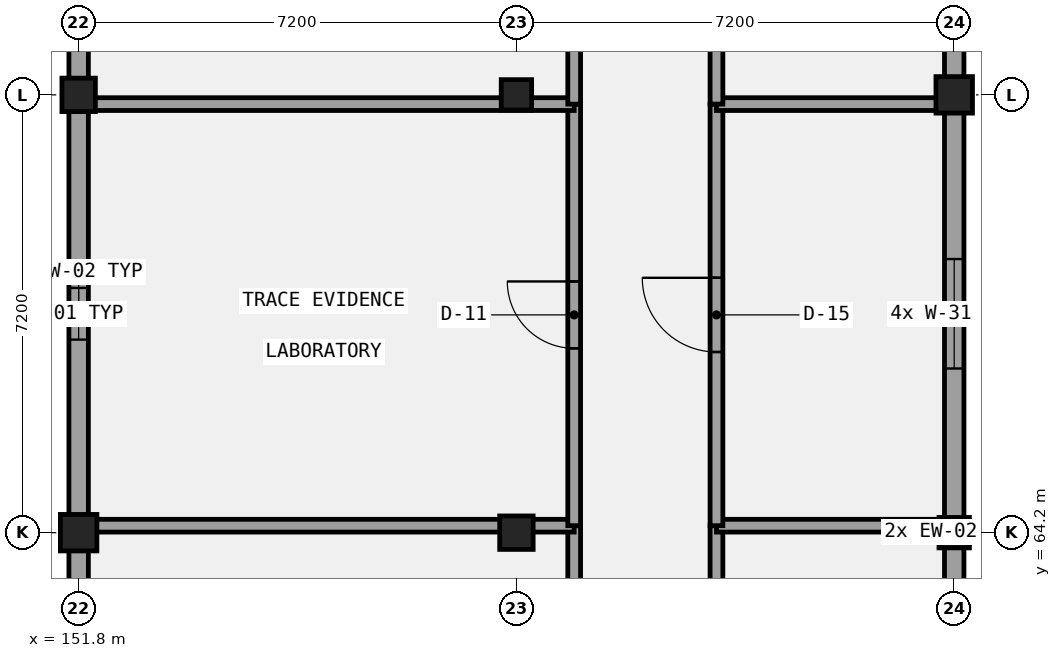
"""IFC4 building model, lengths in metres.
Left out: names, types, materials, properties, quantities, classifications, styles, units other than length and angle.
Written with IfcOpenShell. Run it as: python <this file> out.ifc"""

import sys

from ifc_helpers import new_model, si_unit, direction, frame, frame_2d, origin, origin_2d, place, context, subcontext, project, spatial, rectangle, extrude, element, fill, save


model = new_model("IFC4")
c1 = context("Model", 3, precision=1e-05, world=origin(), true_north=direction((0.0, 1.0)))
c2 = subcontext(c1, "Body", "Model", "MODEL_VIEW")
j1 = project(units=[si_unit("LENGTHUNIT", "METRE"), si_unit("PLANEANGLEUNIT", "RADIAN")], contexts=[c1])
p1 = place(None, origin())
s1 = spatial("IfcSite", under=j1, at=p1, CompositionType="ELEMENT")
p2 = place(p1, origin())
s2 = spatial("IfcBuilding", under=s1, at=p2, CompositionType="ELEMENT")
p3 = place(p2, frame((0.0, 0.0, 18.0)))
s3 = spatial("IfcBuildingStorey", under=s2, at=p3, CompositionType="ELEMENT", Elevation=18.0)
p4 = place(p3, frame((151.8, 64.2, 0.0), z_axis=(0.0, 0.0, 1.0), x_axis=(1.0, 0.0, 0.0)))
e1 = element("IfcColumn", 1, at=p4, inside=s3, PredefinedType="COLUMN", context=c2, shape_type="SweptSolid", body=[
    extrude(rectangle(XDim=0.6, YDim=0.6, at=origin_2d()), origin(), (0.0, 0.0, 1.0), 4.2),
])
for number, where, z_axis, x_axis in (
    (2, (151.8, 71.4, 0.0), (0.0, 0.0, 1.0), (1.0, 0.0, 0.0)),
    (3, (159.0, 64.2, 0.0), (0.0, 0.0, 1.0), (1.0, 0.0, 0.0)),
):
    element("IfcColumn", number, at=place(p3, frame(where, z_axis=z_axis, x_axis=x_axis)), inside=s3, PredefinedType="COLUMN", context=c2, shape_type="SweptSolid", body=[
        extrude(rectangle(XDim=0.55, YDim=0.55, at=origin_2d()), origin(), (0.0, 0.0, 1.0), 4.2),
    ])
for number, where, z_axis, x_axis in (
    (4, (159.0, 71.4, 0.0), (0.0, 0.0, 1.0), (1.0, 0.0, 0.0)),
    (5, (166.2, 64.2, 0.0), (0.0, 0.0, 1.0), (1.0, 0.0, 0.0)),
):
    element("IfcColumn", number, at=place(p3, frame(where, z_axis=z_axis, x_axis=x_axis)), inside=s3, PredefinedType="COLUMN", context=c2, shape_type="SweptSolid", body=[
        extrude(rectangle(XDim=0.5, YDim=0.5, at=origin_2d()), origin(), (0.0, 0.0, 1.0), 4.2),
    ])
p5 = place(p3, frame((166.2, 71.4, 0.0), z_axis=(0.0, 0.0, 1.0), x_axis=(1.0, 0.0, 0.0)))
e6 = element("IfcColumn", 6, at=p5, inside=s3, PredefinedType="COLUMN", context=c2, shape_type="SweptSolid", body=[
    extrude(rectangle(XDim=0.6, YDim=0.6, at=origin_2d()), origin(), (0.0, 0.0, 1.0), 4.2),
])
p6 = place(p3, frame((151.8, 78.44, 0.0), z_axis=(0.0, 0.0, 1.0), x_axis=(0.0, -1.0, 0.0)))
e7 = element("IfcWall", 7, at=p6, inside=s3, PredefinedType="SOLIDWALL", context=c2, shape_type="SweptSolid", body=[
    extrude(rectangle(XDim=28.45, YDim=0.32, at=frame_2d((14.225, 0.0))), origin(), (0.0, 0.0, 1.0), 3.19),
])
p7 = place(p6, frame((24.52, 0.0, 1.0)))
e8 = element("IfcOpeningElement", 8, at=p7, cuts=e7, PredefinedType="OPENING", context=c2, shape_type="SweptSolid", body=[
    extrude(rectangle(XDim=0.85, YDim=1.65, at=frame_2d((0.425, 0.825))), frame((0.0, 0.17, 0.0), z_axis=(0.0, -1.0, 0.0), x_axis=(1.0, 0.0, 0.0)), (0.0, 0.0, 1.0), 0.34),
])
p8 = place(p6, frame((17.415, 0.0, 1.0)))
e9 = element("IfcOpeningElement", 9, at=p8, cuts=e7, PredefinedType="OPENING", context=c2, shape_type="SweptSolid", body=[
    extrude(rectangle(XDim=0.85, YDim=1.65, at=frame_2d((0.425, 0.825))), frame((0.0, 0.17, 0.0), z_axis=(0.0, -1.0, 0.0), x_axis=(1.0, 0.0, 0.0)), (0.0, 0.0, 1.0), 0.34),
])
p9 = place(p6, frame((10.215, 0.0, 1.0)))
e10 = element("IfcOpeningElement", 10, at=p9, cuts=e7, PredefinedType="OPENING", context=c2, shape_type="SweptSolid", body=[
    extrude(rectangle(XDim=0.85, YDim=1.65, at=frame_2d((0.425, 0.825))), frame((0.0, 0.17, 0.0), z_axis=(0.0, -1.0, 0.0), x_axis=(1.0, 0.0, 0.0)), (0.0, 0.0, 1.0), 0.34),
])
p10 = place(p6, frame((3.095, 0.0, 1.0)))
e11 = element("IfcOpeningElement", 11, at=p10, cuts=e7, PredefinedType="OPENING", context=c2, shape_type="SweptSolid", body=[
    extrude(rectangle(XDim=0.85, YDim=1.65, at=frame_2d((0.425, 0.825))), frame((0.0, 0.17, 0.0), z_axis=(0.0, -1.0, 0.0), x_axis=(1.0, 0.0, 0.0)), (0.0, 0.0, 1.0), 0.34),
])
p11 = place(p3, frame((166.2, 49.99, 0.0), z_axis=(0.0, 0.0, 1.0), x_axis=(0.0, 1.0, 0.0)))
e12 = element("IfcWall", 12, at=p11, inside=s3, PredefinedType="SOLIDWALL", context=c2, shape_type="SweptSolid", body=[
    extrude(rectangle(XDim=28.45, YDim=0.32, at=frame_2d((14.225, 0.0))), origin(), (0.0, 0.0, 1.0), 3.09),
])
p12 = place(p11, frame((2.605, 0.0, 1.0)))
e13 = element("IfcOpeningElement", 13, at=p12, cuts=e12, PredefinedType="OPENING", context=c2, shape_type="SweptSolid", body=[
    extrude(rectangle(XDim=1.8, YDim=1.4, at=frame_2d((0.9, 0.7))), frame((0.0, 0.17, 0.0), z_axis=(0.0, -1.0, 0.0), x_axis=(1.0, 0.0, 0.0)), (0.0, 0.0, 1.0), 0.34),
])
p13 = place(p11, frame((9.71, 0.0, 1.0)))
e14 = element("IfcOpeningElement", 14, at=p13, cuts=e12, PredefinedType="OPENING", context=c2, shape_type="SweptSolid", body=[
    extrude(rectangle(XDim=1.8, YDim=1.4, at=frame_2d((0.9, 0.7))), frame((0.0, 0.17, 0.0), z_axis=(0.0, -1.0, 0.0), x_axis=(1.0, 0.0, 0.0)), (0.0, 0.0, 1.0), 0.34),
])
p14 = place(p11, frame((16.91, 0.0, 1.0)))
e15 = element("IfcOpeningElement", 15, at=p14, cuts=e12, PredefinedType="OPENING", context=c2, shape_type="SweptSolid", body=[
    extrude(rectangle(XDim=1.8, YDim=1.4, at=frame_2d((0.9, 0.7))), frame((0.0, 0.17, 0.0), z_axis=(0.0, -1.0, 0.0), x_axis=(1.0, 0.0, 0.0)), (0.0, 0.0, 1.0), 0.34),
])
p15 = place(p11, frame((24.03, 0.0, 1.0)))
e16 = element("IfcOpeningElement", 16, at=p15, cuts=e12, PredefinedType="OPENING", context=c2, shape_type="SweptSolid", body=[
    extrude(rectangle(XDim=1.8, YDim=1.4, at=frame_2d((0.9, 0.7))), frame((0.0, 0.17, 0.0), z_axis=(0.0, -1.0, 0.0), x_axis=(1.0, 0.0, 0.0)), (0.0, 0.0, 1.0), 0.34),
])
p16 = place(p3, frame((159.95, 57.383, 0.0), z_axis=(0.0, 0.0, 1.0), x_axis=(0.0, 1.0, 0.0)))
e17 = element("IfcWall", 17, at=p16, inside=s3, PredefinedType="PARTITIONING", context=c2, shape_type="SweptSolid", body=[
    extrude(rectangle(XDim=6.932, YDim=0.21, at=frame_2d((3.466, 0.0))), origin(), (0.0, 0.0, 1.0), 3.94),
])
p17 = place(p16, frame((2.916, 0.0, 0.0)))
e18 = element("IfcOpeningElement", 18, at=p17, cuts=e17, PredefinedType="OPENING", context=c2, shape_type="SweptSolid", body=[
    extrude(rectangle(XDim=1.1, YDim=2.1, at=frame_2d((0.55, 1.05))), frame((0.0, 0.115, 0.0), z_axis=(0.0, -1.0, 0.0), x_axis=(1.0, 0.0, 0.0)), (0.0, 0.0, 1.0), 0.23),
])
p18 = place(p3, frame((151.98, 64.315, 0.0), z_axis=(0.0, 0.0, 1.0), x_axis=(1.0, 0.0, 0.0)))
e19 = element("IfcWall", 19, at=p18, inside=s3, PredefinedType="PARTITIONING", context=c2, shape_type="SweptSolid", body=[
    extrude(rectangle(XDim=7.97, YDim=0.21, at=frame_2d((3.985, 0.0))), origin(), (0.0, 0.0, 1.0), 3.34),
])
p19 = place(p3, frame((159.95, 64.315, 0.0), z_axis=(0.0, 0.0, 1.0), x_axis=(0.0, 1.0, 0.0)))
e20 = element("IfcWall", 20, at=p19, inside=s3, PredefinedType="PARTITIONING", context=c2, shape_type="SweptSolid", body=[
    extrude(rectangle(XDim=6.933, YDim=0.21, at=frame_2d((3.467, 0.0))), origin(), (0.0, 0.0, 1.0), 3.94),
])
p20 = place(p19, frame((2.917, 0.0, 0.0)))
e21 = element("IfcOpeningElement", 21, at=p20, cuts=e20, PredefinedType="OPENING", context=c2, shape_type="SweptSolid", body=[
    extrude(rectangle(XDim=1.1, YDim=2.22, at=frame_2d((0.55, 1.11))), frame((0.0, 0.115, 0.0), z_axis=(0.0, -1.0, 0.0), x_axis=(1.0, 0.0, 0.0)), (0.0, 0.0, 1.0), 0.23),
])
p21 = place(p3, frame((151.98, 71.248, 0.0), z_axis=(0.0, 0.0, 1.0), x_axis=(1.0, 0.0, 0.0)))
e22 = element("IfcWall", 22, at=p21, inside=s3, PredefinedType="PARTITIONING", context=c2, shape_type="SweptSolid", body=[
    extrude(rectangle(XDim=7.97, YDim=0.21, at=frame_2d((3.985, 0.0))), origin(), (0.0, 0.0, 1.0), 3.29),
])
p22 = place(p3, frame((159.95, 71.248, 0.0), z_axis=(0.0, 0.0, 1.0), x_axis=(0.0, 1.0, 0.0)))
e23 = element("IfcWall", 23, at=p22, inside=s3, PredefinedType="PARTITIONING", context=c2, shape_type="SweptSolid", body=[
    extrude(rectangle(XDim=6.932, YDim=0.21, at=frame_2d((3.466, 0.0))), origin(), (0.0, 0.0, 1.0), 3.94),
])
p23 = place(p22, frame((2.916, 0.0, 0.0)))
e24 = element("IfcOpeningElement", 24, at=p23, cuts=e23, PredefinedType="OPENING", context=c2, shape_type="SweptSolid", body=[
    extrude(rectangle(XDim=1.1, YDim=2.35, at=frame_2d((0.55, 1.175))), frame((0.0, 0.115, 0.0), z_axis=(0.0, -1.0, 0.0), x_axis=(1.0, 0.0, 0.0)), (0.0, 0.0, 1.0), 0.23),
])
p24 = place(p3, frame((162.29, 57.383, 0.0), z_axis=(0.0, 0.0, 1.0), x_axis=(0.0, 1.0, 0.0)))
e25 = element("IfcWall", 25, at=p24, inside=s3, PredefinedType="PARTITIONING", context=c2, shape_type="SweptSolid", body=[
    extrude(rectangle(XDim=6.932, YDim=0.21, at=frame_2d((3.466, 0.0))), origin(), (0.0, 0.0, 1.0), 3.94),
])
p25 = place(p24, frame((2.856, 0.0, 0.0)))
e26 = element("IfcOpeningElement", 26, at=p25, cuts=e25, PredefinedType="OPENING", context=c2, shape_type="SweptSolid", body=[
    extrude(rectangle(XDim=1.22, YDim=2.22, at=frame_2d((0.61, 1.11))), frame((0.0, 0.115, 0.0), z_axis=(0.0, -1.0, 0.0), x_axis=(1.0, 0.0, 0.0)), (0.0, 0.0, 1.0), 0.23),
])
p26 = place(p3, frame((162.29, 64.315, 0.0), z_axis=(0.0, 0.0, 1.0), x_axis=(1.0, 0.0, 0.0)))
e27 = element("IfcWall", 27, at=p26, inside=s3, PredefinedType="PARTITIONING", context=c2, shape_type="SweptSolid", body=[
    extrude(rectangle(XDim=3.73, YDim=0.21, at=frame_2d((1.865, 0.0))), origin(), (0.0, 0.0, 1.0), 3.34),
])
p27 = place(p3, frame((162.29, 64.315, 0.0), z_axis=(0.0, 0.0, 1.0), x_axis=(0.0, 1.0, 0.0)))
e28 = element("IfcWall", 28, at=p27, inside=s3, PredefinedType="PARTITIONING", context=c2, shape_type="SweptSolid", body=[
    extrude(rectangle(XDim=6.933, YDim=0.21, at=frame_2d((3.467, 0.0))), origin(), (0.0, 0.0, 1.0), 3.94),
])
p28 = place(p27, frame((2.856, 0.0, 0.0)))
e29 = element("IfcOpeningElement", 29, at=p28, cuts=e28, PredefinedType="OPENING", context=c2, shape_type="SweptSolid", body=[
    extrude(rectangle(XDim=1.22, YDim=2.35, at=frame_2d((0.61, 1.175))), frame((0.0, 0.115, 0.0), z_axis=(0.0, -1.0, 0.0), x_axis=(1.0, 0.0, 0.0)), (0.0, 0.0, 1.0), 0.23),
])
p29 = place(p3, frame((162.29, 71.248, 0.0), z_axis=(0.0, 0.0, 1.0), x_axis=(1.0, 0.0, 0.0)))
e30 = element("IfcWall", 30, at=p29, inside=s3, PredefinedType="PARTITIONING", context=c2, shape_type="SweptSolid", body=[
    extrude(rectangle(XDim=3.73, YDim=0.21, at=frame_2d((1.865, 0.0))), origin(), (0.0, 0.0, 1.0), 3.29),
])
p30 = place(p3, frame((162.29, 71.248, 0.0), z_axis=(0.0, 0.0, 1.0), x_axis=(0.0, 1.0, 0.0)))
e31 = element("IfcWall", 31, at=p30, inside=s3, PredefinedType="PARTITIONING", context=c2, shape_type="SweptSolid", body=[
    extrude(rectangle(XDim=6.932, YDim=0.21, at=frame_2d((3.466, 0.0))), origin(), (0.0, 0.0, 1.0), 3.94),
])
p31 = place(p30, frame((2.786, 0.0, 0.0)))
e32 = element("IfcOpeningElement", 32, at=p31, cuts=e31, PredefinedType="OPENING", context=c2, shape_type="SweptSolid", body=[
    extrude(rectangle(XDim=1.36, YDim=2.1, at=frame_2d((0.68, 1.05))), frame((0.0, 0.115, 0.0), z_axis=(0.0, -1.0, 0.0), x_axis=(1.0, 0.0, 0.0)), (0.0, 0.0, 1.0), 0.23),
])
p32 = place(p9, origin())
e33 = element("IfcWindow", 33, at=p32, inside=s3, PartitioningType="SINGLE_PANEL", PredefinedType="WINDOW", context=c2, shape_type="SweptSolid", body=[
    extrude(rectangle(XDim=0.85, YDim=1.65, at=frame_2d((0.425, 0.825))), frame((0.0, 0.03, 0.0), z_axis=(0.0, -1.0, 0.0), x_axis=(1.0, 0.0, 0.0)), (0.0, 0.0, 1.0), 0.06),
])
fill(e10, e33)
p33 = place(p14, origin())
e34 = element("IfcWindow", 34, at=p33, inside=s3, PartitioningType="SINGLE_PANEL", PredefinedType="WINDOW", context=c2, shape_type="SweptSolid", body=[
    extrude(rectangle(XDim=1.8, YDim=1.4, at=frame_2d((0.9, 0.7))), frame((0.0, 0.03, 0.0), z_axis=(0.0, -1.0, 0.0), x_axis=(1.0, 0.0, 0.0)), (0.0, 0.0, 1.0), 0.06),
])
fill(e15, e34)
p34 = place(p20, frame((1.1, 0.0, 0.0), z_axis=(0.0, 0.0, 1.0), x_axis=(-1.0, 0.0, 0.0)))
e35 = element("IfcDoor", 35, at=p34, inside=s3, OperationType="SINGLE_SWING_RIGHT", PredefinedType="DOOR", context=c2, shape_type="SweptSolid", body=[
    extrude(rectangle(XDim=1.1, YDim=2.22, at=frame_2d((0.55, 1.11))), frame((0.0, 0.025, 0.0), z_axis=(0.0, -1.0, 0.0), x_axis=(1.0, 0.0, 0.0)), (0.0, 0.0, 1.0), 0.05),
])
fill(e21, e35)
p35 = place(p28, origin())
e36 = element("IfcDoor", 36, at=p35, inside=s3, OperationType="SINGLE_SWING_RIGHT", PredefinedType="DOOR", context=c2, shape_type="SweptSolid", body=[
    extrude(rectangle(XDim=1.22, YDim=2.35, at=frame_2d((0.61, 1.175))), frame((0.0, 0.025, 0.0), z_axis=(0.0, -1.0, 0.0), x_axis=(1.0, 0.0, 0.0)), (0.0, 0.0, 1.0), 0.05),
])
fill(e29, e36)
save(model, sys.argv[1])
